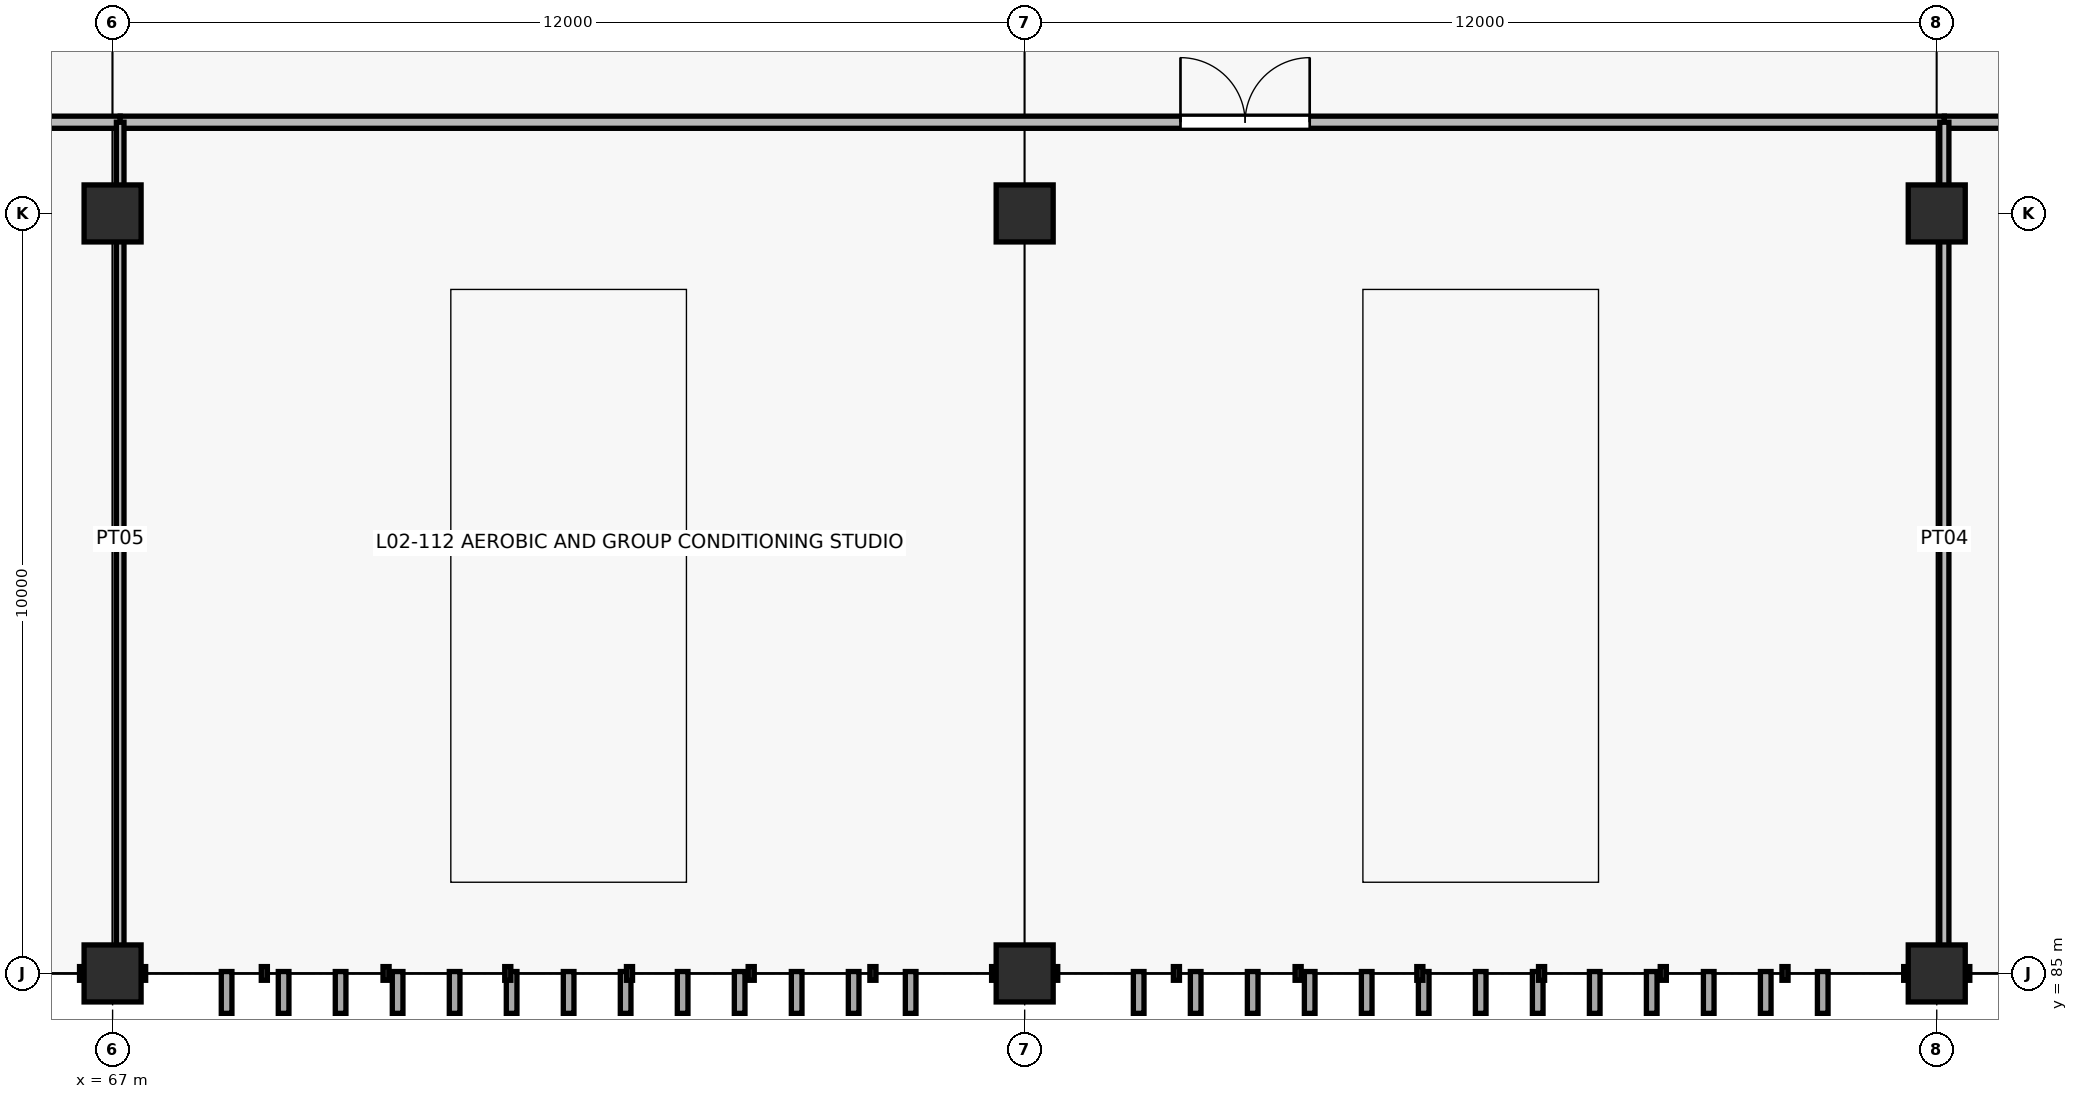
"""IFC4 building model, lengths in metres.
Left out: names, types, materials, properties, quantities, classifications, styles, units other than length and angle.
Written with IfcOpenShell. Run it as: python <this file> out.ifc"""

import sys

from ifc_helpers import new_model, si_unit, direction, frame, frame_2d, origin, origin_2d, place, context, subcontext, project, spatial, rectangle, extrude, element, fill, save


model = new_model("IFC4")
c1 = context("Model", 3, precision=1e-05, world=origin(), true_north=direction((0.0, 1.0)))
c2 = subcontext(c1, "Body", "Model", "MODEL_VIEW")
j1 = project(units=[si_unit("LENGTHUNIT", "METRE"), si_unit("PLANEANGLEUNIT", "RADIAN")], contexts=[c1])
p1 = place(None, origin())
s1 = spatial("IfcSite", under=j1, at=p1, CompositionType="ELEMENT")
p2 = place(p1, origin())
s2 = spatial("IfcBuilding", under=s1, at=p2, CompositionType="ELEMENT")
p3 = place(p2, frame((0.0, 0.0, 9.0)))
s3 = spatial("IfcBuildingStorey", under=s2, at=p3, CompositionType="ELEMENT", Elevation=9.0)
for number, where, z_axis, x_axis in (
    (1, (67.0, 85.0, 0.0), (0.0, 0.0, 1.0), (1.0, 0.0, 0.0)),
    (2, (67.0, 95.0, 0.0), (0.0, 0.0, 1.0), (1.0, 0.0, 0.0)),
    (3, (79.0, 85.0, 0.0), (0.0, 0.0, 1.0), (1.0, 0.0, 0.0)),
    (4, (79.0, 95.0, 0.0), (0.0, 0.0, 1.0), (1.0, 0.0, 0.0)),
    (5, (91.0, 85.0, 0.0), (0.0, 0.0, 1.0), (1.0, 0.0, 0.0)),
    (6, (91.0, 95.0, 0.0), (0.0, 0.0, 1.0), (1.0, 0.0, 0.0)),
):
    element("IfcColumn", number, at=place(p3, frame(where, z_axis=z_axis, x_axis=x_axis)), inside=s3, PredefinedType="COLUMN", context=c2, shape_type="SweptSolid", body=[
        extrude(rectangle(XDim=0.75, YDim=0.75, at=origin_2d()), origin(), (0.0, 0.0, 1.0), 4.2),
    ])
p4 = place(p3, frame((43.18, 96.2, 0.0), z_axis=(0.0, 0.0, 1.0), x_axis=(1.0, 0.0, 0.0)))
e7 = element("IfcWall", 7, at=p4, inside=s3, PredefinedType="PARTITIONING", context=c2, shape_type="SweptSolid", body=[
    extrude(rectangle(XDim=23.92, YDim=0.16, at=frame_2d((11.96, 0.0))), origin(), (0.0, 0.0, 1.0), 2.905),
])
p5 = place(p4, frame((14.01, 0.0, 0.0)))
e8 = element("IfcOpeningElement", 8, at=p5, cuts=e7, PredefinedType="OPENING", context=c2, shape_type="SweptSolid", body=[
    extrude(rectangle(XDim=1.5, YDim=2.2, at=frame_2d((0.75, 1.1))), frame((0.0, 0.09, 0.0), z_axis=(0.0, -1.0, 0.0), x_axis=(1.0, 0.0, 0.0)), (0.0, 0.0, 1.0), 0.18),
])
p6 = place(p3, frame((67.1, 96.2, 0.0), z_axis=(0.0, 0.0, 1.0), x_axis=(1.0, 0.0, 0.0)))
e9 = element("IfcWall", 9, at=p6, inside=s3, PredefinedType="PARTITIONING", context=c2, shape_type="SweptSolid", body=[
    extrude(rectangle(XDim=24.0, YDim=0.16, at=frame_2d((12.0, 0.0))), origin(), (0.0, 0.0, 1.0), 2.905),
])
p7 = place(p6, frame((13.95, 0.0, 0.0)))
e10 = element("IfcOpeningElement", 10, at=p7, cuts=e9, PredefinedType="OPENING", context=c2, shape_type="SweptSolid", body=[
    extrude(rectangle(XDim=1.7, YDim=2.25, at=frame_2d((0.85, 1.125))), frame((0.0, 0.09, 0.0), z_axis=(0.0, -1.0, 0.0), x_axis=(1.0, 0.0, 0.0)), (0.0, 0.0, 1.0), 0.18),
])
p8 = place(p3, frame((67.1, 85.22, 0.0), z_axis=(0.0, 0.0, 1.0), x_axis=(0.0, 1.0, 0.0)))
e11 = element("IfcWall", 11, at=p8, inside=s3, PredefinedType="PARTITIONING", context=c2, shape_type="SweptSolid", body=[
    extrude(rectangle(XDim=10.98, YDim=0.1, at=frame_2d((5.49, 0.0))), origin(), (0.0, 0.0, 1.0), 2.905),
])
p9 = place(p3, frame((91.1, 96.2, 0.0), z_axis=(0.0, 0.0, 1.0), x_axis=(1.0, 0.0, 0.0)))
e12 = element("IfcWall", 12, at=p9, inside=s3, PredefinedType="PARTITIONING", context=c2, shape_type="SweptSolid", body=[
    extrude(rectangle(XDim=20.0, YDim=0.16, at=frame_2d((10.0, 0.0))), origin(), (0.0, 0.0, 1.0), 2.905),
])
p10 = place(p9, frame((12.15, 0.0, 0.0)))
e13 = element("IfcOpeningElement", 13, at=p10, cuts=e12, PredefinedType="OPENING", context=c2, shape_type="SweptSolid", body=[
    extrude(rectangle(XDim=1.3, YDim=2.2, at=frame_2d((0.65, 1.1))), frame((0.0, 0.09, 0.0), z_axis=(0.0, -1.0, 0.0), x_axis=(1.0, 0.0, 0.0)), (0.0, 0.0, 1.0), 0.18),
])
p11 = place(p3, frame((91.1, 85.22, 0.0), z_axis=(0.0, 0.0, 1.0), x_axis=(0.0, 1.0, 0.0)))
e14 = element("IfcWall", 14, at=p11, inside=s3, PredefinedType="PARTITIONING", context=c2, shape_type="SweptSolid", body=[
    extrude(rectangle(XDim=10.98, YDim=0.12, at=frame_2d((5.49, 0.0))), origin(), (0.0, 0.0, 1.0), 2.905),
])
p12 = place(p7, origin())
e15 = element("IfcDoor", 15, at=p12, inside=s3, OperationType="DOUBLE_DOOR_SINGLE_SWING", PredefinedType="DOOR", context=c2, shape_type="SweptSolid", body=[
    extrude(rectangle(XDim=1.7, YDim=2.25, at=frame_2d((0.85, 1.125))), frame((0.0, 0.025, 0.0), z_axis=(0.0, -1.0, 0.0), x_axis=(1.0, 0.0, 0.0)), (0.0, 0.0, 1.0), 0.05),
])
fill(e10, e15)
save(model, sys.argv[1])
